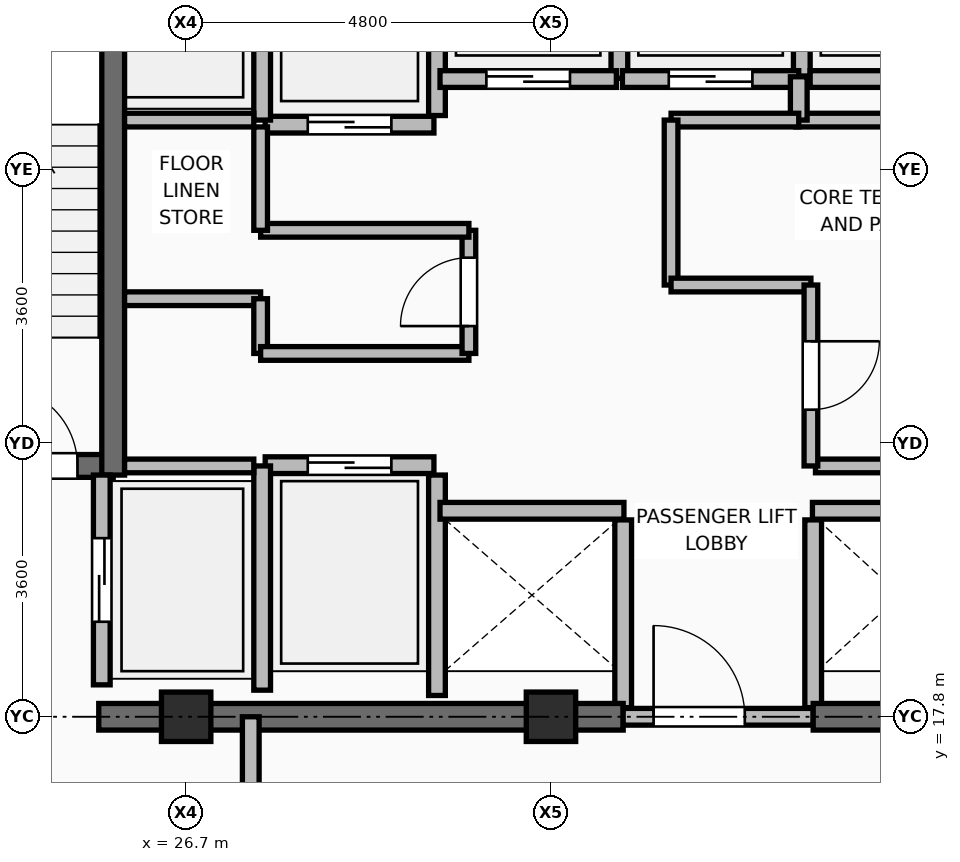
"""IFC4 building model, lengths in metres.
Left out: names, types, materials, properties, quantities, classifications, styles, units other than length and angle.
Written with IfcOpenShell. Run it as: python <this file> out.ifc"""

import sys

from ifc_helpers import new_model, si_unit, direction, frame, frame_2d, origin, origin_2d, place, context, subcontext, project, spatial, rectangle, extrude, element, fill, save


model = new_model("IFC4")
c1 = context("Model", 3, precision=1e-05, world=origin(), true_north=direction((0.0, 1.0)))
c2 = subcontext(c1, "Body", "Model", "MODEL_VIEW")
j1 = project(units=[si_unit("LENGTHUNIT", "METRE"), si_unit("PLANEANGLEUNIT", "RADIAN")], contexts=[c1])
p1 = place(None, origin())
s1 = spatial("IfcSite", under=j1, at=p1, CompositionType="ELEMENT")
p2 = place(p1, origin())
s2 = spatial("IfcBuilding", under=s1, at=p2, CompositionType="ELEMENT")
p3 = place(p2, frame((0.0, 0.0, 278.85)))
s3 = spatial("IfcBuildingStorey", under=s2, at=p3, CompositionType="ELEMENT", Elevation=278.85)
for number, where, z_axis, x_axis in (
    (1, (26.7, 17.8, 0.0), (0.0, 0.0, 1.0), (1.0, 0.0, 0.0)),
    (2, (31.5, 17.8, 0.0), (0.0, 0.0, 1.0), (1.0, 0.0, 0.0)),
):
    element("IfcColumn", number, at=place(p3, frame(where, z_axis=z_axis, x_axis=x_axis)), inside=s3, PredefinedType="COLUMN", context=c2, shape_type="SweptSolid", body=[
        extrude(rectangle(XDim=0.65, YDim=0.65, at=origin_2d()), origin(), (0.0, 0.0, 1.0), 3.75),
    ])
p4 = place(p3, frame((30.0, 18.08, 0.0), z_axis=(0.0, 0.0, 1.0), x_axis=(0.0, 1.0, 0.0)))
e3 = element("IfcWall", 3, at=p4, inside=s3, PredefinedType="PARTITIONING", context=c2, shape_type="SweptSolid", body=[
    extrude(rectangle(XDim=2.9, YDim=0.22, at=frame_2d((1.45, 0.0))), origin(), (0.0, 0.0, 1.0), 3.545),
])
for number, where, z_axis, x_axis in (
    (4, (32.45, 17.92, 0.0), (0.0, 0.0, 1.0), (0.0, 1.0, 0.0)),
    (5, (34.95, 17.92, 0.0), (0.0, 0.0, 1.0), (0.0, 1.0, 0.0)),
):
    element("IfcWall", number, at=place(p3, frame(where, z_axis=z_axis, x_axis=x_axis)), inside=s3, PredefinedType="PARTITIONING", context=c2, shape_type="SweptSolid", body=[
        extrude(rectangle(XDim=2.47, YDim=0.22, at=frame_2d((1.235, 0.0))), origin(), (0.0, 0.0, 1.0), 3.545),
    ])
p5 = place(p3, frame((30.0, 25.71, 0.0), z_axis=(0.0, 0.0, 1.0), x_axis=(0.0, 1.0, 0.0)))
e6 = element("IfcWall", 6, at=p5, inside=s3, PredefinedType="PARTITIONING", context=c2, shape_type="SweptSolid", body=[
    extrude(rectangle(XDim=2.73, YDim=0.22, at=frame_2d((1.365, 0.0))), origin(), (0.0, 0.0, 1.0), 3.545),
])
p6 = place(p3, frame((32.4, 26.2, 0.0), z_axis=(0.0, 0.0, 1.0), x_axis=(0.0, 1.0, 0.0)))
e7 = element("IfcWall", 7, at=p6, inside=s3, PredefinedType="PARTITIONING", context=c2, shape_type="SweptSolid", body=[
    extrude(rectangle(XDim=2.24, YDim=0.22, at=frame_2d((1.12, 0.0))), origin(), (0.0, 0.0, 1.0), 3.545),
])
p7 = place(p3, frame((34.8, 26.23, 0.0), z_axis=(0.0, 0.0, 1.0), x_axis=(0.0, 1.0, 0.0)))
e8 = element("IfcWall", 8, at=p7, inside=s3, PredefinedType="PARTITIONING", context=c2, shape_type="SweptSolid", body=[
    extrude(rectangle(XDim=2.21, YDim=0.22, at=frame_2d((1.105, 0.0))), origin(), (0.0, 0.0, 1.0), 3.545),
])
p8 = place(p3, frame((34.91, 26.19, 0.0), z_axis=(0.0, 0.0, 1.0), x_axis=(1.0, 0.0, 0.0)))
e9 = element("IfcWall", 9, at=p8, inside=s3, PredefinedType="PARTITIONING", context=c2, shape_type="SweptSolid", body=[
    extrude(rectangle(XDim=2.14, YDim=0.22, at=frame_2d((1.07, 0.0))), origin(), (0.0, 0.0, 1.0), 3.545),
])
p9 = place(p3, frame((25.55, 17.8, 0.0), z_axis=(0.0, 0.0, 1.0), x_axis=(1.0, 0.0, 0.0)))
e10 = element("IfcWall", 10, at=p9, inside=s3, PredefinedType="SHEAR", context=c2, shape_type="SweptSolid", body=[
    extrude(rectangle(XDim=6.9, YDim=0.35, at=frame_2d((3.45, 0.0))), origin(), (0.0, 0.0, 1.0), 3.57),
])
p10 = place(p3, frame((32.45, 17.8, 0.0), z_axis=(0.0, 0.0, 1.0), x_axis=(1.0, 0.0, 0.0)))
e11 = element("IfcWall", 11, at=p10, inside=s3, PredefinedType="PARTITIONING", context=c2, shape_type="SweptSolid", body=[
    extrude(rectangle(XDim=2.5, YDim=0.22, at=frame_2d((1.25, 0.0))), origin(), (0.0, 0.0, 1.0), 3.132),
])
p11 = place(p10, frame((0.4, 0.0, 0.0)))
e12 = element("IfcOpeningElement", 12, at=p11, cuts=e11, PredefinedType="OPENING", context=c2, shape_type="SweptSolid", body=[
    extrude(rectangle(XDim=1.2, YDim=2.1, at=frame_2d((0.6, 1.05))), frame((0.0, 0.12, 0.0), z_axis=(0.0, -1.0, 0.0), x_axis=(1.0, 0.0, 0.0)), (0.0, 0.0, 1.0), 0.24),
])
p12 = place(p3, frame((34.95, 17.8, 0.0), z_axis=(0.0, 0.0, 1.0), x_axis=(1.0, 0.0, 0.0)))
e13 = element("IfcWall", 13, at=p12, inside=s3, PredefinedType="SHEAR", context=c2, shape_type="SweptSolid", body=[
    extrude(rectangle(XDim=6.325, YDim=0.35, at=frame_2d((3.163, 0.0))), origin(), (0.0, 0.0, 1.0), 3.57),
])
p13 = place(p3, frame((22.075, 21.1, 0.0), z_axis=(0.0, 0.0, 1.0), x_axis=(1.0, 0.0, 0.0)))
e14 = element("IfcWall", 14, at=p13, inside=s3, PredefinedType="SHEAR", context=c2, shape_type="SweptSolid", body=[
    extrude(rectangle(XDim=3.665, YDim=0.3, at=frame_2d((1.833, 0.0))), origin(), (0.0, 0.0, 1.0), 3.57),
])
p14 = place(p13, frame((2.145, 0.0, 0.0)))
e15 = element("IfcOpeningElement", 15, at=p14, cuts=e14, PredefinedType="OPENING", context=c2, shape_type="SweptSolid", body=[
    extrude(rectangle(XDim=1.05, YDim=2.1, at=frame_2d((0.525, 1.05))), frame((0.0, 0.16, 0.0), z_axis=(0.0, -1.0, 0.0), x_axis=(1.0, 0.0, 0.0)), (0.0, 0.0, 1.0), 0.32),
])
p15 = place(p3, frame((25.74, 20.98, 0.0), z_axis=(0.0, 0.0, 1.0), x_axis=(0.0, 1.0, 0.0)))
e16 = element("IfcWall", 16, at=p15, inside=s3, PredefinedType="SHEAR", context=c2, shape_type="SweptSolid", body=[
    extrude(rectangle(XDim=7.99, YDim=0.3, at=frame_2d((3.995, 0.0))), origin(), (0.0, 0.0, 1.0), 3.57),
])
p16 = place(p3, frame((25.59, 18.22, 0.0), z_axis=(0.0, 0.0, 1.0), x_axis=(0.0, 1.0, 0.0)))
e17 = element("IfcWall", 17, at=p16, inside=s3, PredefinedType="PARTITIONING", context=c2, shape_type="SweptSolid", body=[
    extrude(rectangle(XDim=2.76, YDim=0.22, at=frame_2d((1.38, 0.0))), origin(), (0.0, 0.0, 1.0), 3.55),
])
p17 = place(p16, frame((0.83, 0.0, 0.0)))
e18 = element("IfcOpeningElement", 18, at=p17, cuts=e17, PredefinedType="OPENING", context=c2, shape_type="SweptSolid", body=[
    extrude(rectangle(XDim=1.1, YDim=2.2, at=frame_2d((0.55, 1.1))), frame((0.0, 0.12, 0.0), z_axis=(0.0, -1.0, 0.0), x_axis=(1.0, 0.0, 0.0)), (0.0, 0.0, 1.0), 0.24),
])
p18 = place(p3, frame((27.74, 21.11, 0.0), z_axis=(0.0, 0.0, 1.0), x_axis=(1.0, 0.0, 0.0)))
e19 = element("IfcWall", 19, at=p18, inside=s3, PredefinedType="PARTITIONING", context=c2, shape_type="SweptSolid", body=[
    extrude(rectangle(XDim=2.22, YDim=0.22, at=frame_2d((1.11, 0.0))), origin(), (0.0, 0.0, 1.0), 3.55),
])
p19 = place(p18, frame((0.56, 0.0, 0.0)))
e20 = element("IfcOpeningElement", 20, at=p19, cuts=e19, PredefinedType="OPENING", context=c2, shape_type="SweptSolid", body=[
    extrude(rectangle(XDim=1.1, YDim=2.2, at=frame_2d((0.55, 1.1))), frame((0.0, 0.12, 0.0), z_axis=(0.0, -1.0, 0.0), x_axis=(1.0, 0.0, 0.0)), (0.0, 0.0, 1.0), 0.24),
])
p20 = place(p3, frame((27.74, 25.59, 0.0), z_axis=(0.0, 0.0, 1.0), x_axis=(1.0, 0.0, 0.0)))
e21 = element("IfcWall", 21, at=p20, inside=s3, PredefinedType="PARTITIONING", context=c2, shape_type="SweptSolid", body=[
    extrude(rectangle(XDim=2.22, YDim=0.22, at=frame_2d((1.11, 0.0))), origin(), (0.0, 0.0, 1.0), 3.55),
])
p21 = place(p20, frame((0.56, 0.0, 0.0)))
e22 = element("IfcOpeningElement", 22, at=p21, cuts=e21, PredefinedType="OPENING", context=c2, shape_type="SweptSolid", body=[
    extrude(rectangle(XDim=1.1, YDim=2.2, at=frame_2d((0.55, 1.1))), frame((0.0, 0.12, 0.0), z_axis=(0.0, -1.0, 0.0), x_axis=(1.0, 0.0, 0.0)), (0.0, 0.0, 1.0), 0.24),
])
p22 = place(p3, frame((30.04, 20.51, 0.0), z_axis=(0.0, 0.0, 1.0), x_axis=(1.0, 0.0, 0.0)))
e23 = element("IfcWall", 23, at=p22, inside=s3, PredefinedType="PARTITIONING", context=c2, shape_type="SweptSolid", body=[
    extrude(rectangle(XDim=2.42, YDim=0.22, at=frame_2d((1.21, 0.0))), origin(), (0.0, 0.0, 1.0), 3.55),
])
p23 = place(p3, frame((34.94, 20.51, 0.0), z_axis=(0.0, 0.0, 1.0), x_axis=(1.0, 0.0, 0.0)))
e24 = element("IfcWall", 24, at=p23, inside=s3, PredefinedType="PARTITIONING", context=c2, shape_type="SweptSolid", body=[
    extrude(rectangle(XDim=2.24, YDim=0.22, at=frame_2d((1.12, 0.0))), origin(), (0.0, 0.0, 1.0), 3.55),
])
p24 = place(p3, frame((30.04, 26.19, 0.0), z_axis=(0.0, 0.0, 1.0), x_axis=(1.0, 0.0, 0.0)))
e25 = element("IfcWall", 25, at=p24, inside=s3, PredefinedType="PARTITIONING", context=c2, shape_type="SweptSolid", body=[
    extrude(rectangle(XDim=2.32, YDim=0.22, at=frame_2d((1.16, 0.0))), origin(), (0.0, 0.0, 1.0), 3.55),
])
p25 = place(p24, frame((0.61, 0.0, 0.0)))
e26 = element("IfcOpeningElement", 26, at=p25, cuts=e25, PredefinedType="OPENING", context=c2, shape_type="SweptSolid", body=[
    extrude(rectangle(XDim=1.1, YDim=2.2, at=frame_2d((0.55, 1.1))), frame((0.0, 0.12, 0.0), z_axis=(0.0, -1.0, 0.0), x_axis=(1.0, 0.0, 0.0)), (0.0, 0.0, 1.0), 0.24),
])
p26 = place(p3, frame((32.44, 26.19, 0.0), z_axis=(0.0, 0.0, 1.0), x_axis=(1.0, 0.0, 0.0)))
e27 = element("IfcWall", 27, at=p26, inside=s3, PredefinedType="PARTITIONING", context=c2, shape_type="SweptSolid", body=[
    extrude(rectangle(XDim=2.32, YDim=0.22, at=frame_2d((1.16, 0.0))), origin(), (0.0, 0.0, 1.0), 3.55),
])
p27 = place(p26, frame((0.61, 0.0, 0.0)))
e28 = element("IfcOpeningElement", 28, at=p27, cuts=e27, PredefinedType="OPENING", context=c2, shape_type="SweptSolid", body=[
    extrude(rectangle(XDim=1.1, YDim=2.2, at=frame_2d((0.55, 1.1))), frame((0.0, 0.12, 0.0), z_axis=(0.0, -1.0, 0.0), x_axis=(1.0, 0.0, 0.0)), (0.0, 0.0, 1.0), 0.24),
])
p28 = place(p3, frame((27.7, 18.15, 0.0), z_axis=(0.0, 0.0, 1.0), x_axis=(0.0, 1.0, 0.0)))
e29 = element("IfcWall", 29, at=p28, inside=s3, PredefinedType="PARTITIONING", context=c2, shape_type="SweptSolid", body=[
    extrude(rectangle(XDim=2.95, YDim=0.22, at=frame_2d((1.475, 0.0))), origin(), (0.0, 0.0, 1.0), 3.55),
])
p29 = place(p3, frame((27.7, 25.65, 0.0), z_axis=(0.0, 0.0, 1.0), x_axis=(0.0, 1.0, 0.0)))
e30 = element("IfcWall", 30, at=p29, inside=s3, PredefinedType="PARTITIONING", context=c2, shape_type="SweptSolid", body=[
    extrude(rectangle(XDim=3.0, YDim=0.22, at=frame_2d((1.5, 0.0))), origin(), (0.0, 0.0, 1.0), 3.55),
])
for number, where, z_axis, x_axis in (
    (31, (25.89, 21.1, 0.0), (0.0, 0.0, 1.0), (1.0, 0.0, 0.0)),
    (32, (25.89, 25.65, 0.0), (0.0, 0.0, 1.0), (1.0, 0.0, 0.0)),
):
    element("IfcWall", number, at=place(p3, frame(where, z_axis=z_axis, x_axis=x_axis)), inside=s3, PredefinedType="PARTITIONING", context=c2, shape_type="SweptSolid", body=[
        extrude(rectangle(XDim=1.7, YDim=0.18, at=frame_2d((0.85, 0.0))), origin(), (0.0, 0.0, 1.0), 3.55),
    ])
p30 = place(p3, frame((25.89, 23.3, 0.0), z_axis=(0.0, 0.0, 1.0), x_axis=(1.0, 0.0, 0.0)))
e33 = element("IfcWall", 33, at=p30, inside=s3, PredefinedType="PARTITIONING", context=c2, shape_type="SweptSolid", body=[
    extrude(rectangle(XDim=1.79, YDim=0.18, at=frame_2d((0.895, 0.0))), origin(), (0.0, 0.0, 1.0), 3.55),
])
p31 = place(p3, frame((27.68, 22.58, 0.0), z_axis=(0.0, 0.0, 1.0), x_axis=(0.0, 1.0, 0.0)))
e34 = element("IfcWall", 34, at=p31, inside=s3, PredefinedType="PARTITIONING", context=c2, shape_type="SweptSolid", body=[
    extrude(rectangle(XDim=0.72, YDim=0.18, at=frame_2d((0.36, 0.0))), origin(), (0.0, 0.0, 1.0), 3.55),
])
p32 = place(p3, frame((27.68, 22.58, 0.0), z_axis=(0.0, 0.0, 1.0), x_axis=(1.0, 0.0, 0.0)))
e35 = element("IfcWall", 35, at=p32, inside=s3, PredefinedType="PARTITIONING", context=c2, shape_type="SweptSolid", body=[
    extrude(rectangle(XDim=2.74, YDim=0.18, at=frame_2d((1.37, 0.0))), origin(), (0.0, 0.0, 1.0), 3.55),
])
p33 = place(p3, frame((30.42, 22.58, 0.0), z_axis=(0.0, 0.0, 1.0), x_axis=(0.0, 1.0, 0.0)))
e36 = element("IfcWall", 36, at=p33, inside=s3, PredefinedType="PARTITIONING", context=c2, shape_type="SweptSolid", body=[
    extrude(rectangle(XDim=1.62, YDim=0.18, at=frame_2d((0.81, 0.0))), origin(), (0.0, 0.0, 1.0), 3.55),
])
p34 = place(p33, frame((0.36, 0.0, 0.0)))
e37 = element("IfcOpeningElement", 37, at=p34, cuts=e36, PredefinedType="OPENING", context=c2, shape_type="SweptSolid", body=[
    extrude(rectangle(XDim=0.9, YDim=2.1, at=frame_2d((0.45, 1.05))), frame((0.0, 0.1, 0.0), z_axis=(0.0, -1.0, 0.0), x_axis=(1.0, 0.0, 0.0)), (0.0, 0.0, 1.0), 0.2),
])
p35 = place(p3, frame((27.68, 24.2, 0.0), z_axis=(0.0, 0.0, 1.0), x_axis=(1.0, 0.0, 0.0)))
e38 = element("IfcWall", 38, at=p35, inside=s3, PredefinedType="PARTITIONING", context=c2, shape_type="SweptSolid", body=[
    extrude(rectangle(XDim=2.74, YDim=0.18, at=frame_2d((1.37, 0.0))), origin(), (0.0, 0.0, 1.0), 3.55),
])
p36 = place(p3, frame((27.68, 24.2, 0.0), z_axis=(0.0, 0.0, 1.0), x_axis=(0.0, 1.0, 0.0)))
e39 = element("IfcWall", 39, at=p36, inside=s3, PredefinedType="PARTITIONING", context=c2, shape_type="SweptSolid", body=[
    extrude(rectangle(XDim=1.36, YDim=0.18, at=frame_2d((0.68, 0.0))), origin(), (0.0, 0.0, 1.0), 3.55),
])
p37 = place(p3, frame((34.98, 21.1, 0.0), z_axis=(0.0, 0.0, 1.0), x_axis=(1.0, 0.0, 0.0)))
e40 = element("IfcWall", 40, at=p37, inside=s3, PredefinedType="PARTITIONING", context=c2, shape_type="SweptSolid", body=[
    extrude(rectangle(XDim=2.08, YDim=0.18, at=frame_2d((1.04, 0.0))), origin(), (0.0, 0.0, 1.0), 3.55),
])
p38 = place(p3, frame((34.72, 25.65, 0.0), z_axis=(0.0, 0.0, 1.0), x_axis=(1.0, 0.0, 0.0)))
e41 = element("IfcWall", 41, at=p38, inside=s3, PredefinedType="PARTITIONING", context=c2, shape_type="SweptSolid", body=[
    extrude(rectangle(XDim=2.34, YDim=0.18, at=frame_2d((1.17, 0.0))), origin(), (0.0, 0.0, 1.0), 3.55),
])
p39 = place(p3, frame((34.76, 25.65, 0.0), z_axis=(0.0, 0.0, 1.0), x_axis=(0.0, 1.0, 0.0)))
e42 = element("IfcWall", 42, at=p39, inside=s3, PredefinedType="PARTITIONING", context=c2, shape_type="SweptSolid", body=[
    extrude(rectangle(XDim=0.57, YDim=0.22, at=frame_2d((0.285, 0.0))), origin(), (0.0, 0.0, 1.0), 3.55),
])
p40 = place(p3, frame((33.08, 25.65, 0.0), z_axis=(0.0, 0.0, 1.0), x_axis=(1.0, 0.0, 0.0)))
e43 = element("IfcWall", 43, at=p40, inside=s3, PredefinedType="PARTITIONING", context=c2, shape_type="SweptSolid", body=[
    extrude(rectangle(XDim=1.68, YDim=0.18, at=frame_2d((0.84, 0.0))), origin(), (0.0, 0.0, 1.0), 3.55),
])
p41 = place(p3, frame((33.08, 23.48, 0.0), z_axis=(0.0, 0.0, 1.0), x_axis=(0.0, 1.0, 0.0)))
e44 = element("IfcWall", 44, at=p41, inside=s3, PredefinedType="PARTITIONING", context=c2, shape_type="SweptSolid", body=[
    extrude(rectangle(XDim=2.17, YDim=0.18, at=frame_2d((1.085, 0.0))), origin(), (0.0, 0.0, 1.0), 3.55),
])
p42 = place(p3, frame((33.08, 23.48, 0.0), z_axis=(0.0, 0.0, 1.0), x_axis=(1.0, 0.0, 0.0)))
e45 = element("IfcWall", 45, at=p42, inside=s3, PredefinedType="PARTITIONING", context=c2, shape_type="SweptSolid", body=[
    extrude(rectangle(XDim=1.84, YDim=0.18, at=frame_2d((0.92, 0.0))), origin(), (0.0, 0.0, 1.0), 3.55),
])
p43 = place(p3, frame((34.92, 21.1, 0.0), z_axis=(0.0, 0.0, 1.0), x_axis=(0.0, 1.0, 0.0)))
e46 = element("IfcWall", 46, at=p43, inside=s3, PredefinedType="PARTITIONING", context=c2, shape_type="SweptSolid", body=[
    extrude(rectangle(XDim=2.38, YDim=0.18, at=frame_2d((1.19, 0.0))), origin(), (0.0, 0.0, 1.0), 3.55),
])
p44 = place(p43, frame((0.74, 0.0, 0.0)))
e47 = element("IfcOpeningElement", 47, at=p44, cuts=e46, PredefinedType="OPENING", context=c2, shape_type="SweptSolid", body=[
    extrude(rectangle(XDim=0.9, YDim=2.1, at=frame_2d((0.45, 1.05))), frame((0.0, 0.1, 0.0), z_axis=(0.0, -1.0, 0.0), x_axis=(1.0, 0.0, 0.0)), (0.0, 0.0, 1.0), 0.2),
])
p45 = place(p3, frame((27.55, 14.35, 0.0), z_axis=(0.0, 0.0, 1.0), x_axis=(0.0, 1.0, 0.0)))
e48 = element("IfcWall", 48, at=p45, inside=s3, PredefinedType="PARTITIONING", context=c2, shape_type="SweptSolid", body=[
    extrude(rectangle(XDim=3.45, YDim=0.22, at=frame_2d((1.725, 0.0))), origin(), (0.0, 0.0, 1.0), 3.132),
])
p46 = place(p45, frame((1.175, 0.0, 0.0)))
e49 = element("IfcOpeningElement", 49, at=p46, cuts=e48, PredefinedType="OPENING", context=c2, shape_type="SweptSolid", body=[
    extrude(rectangle(XDim=1.1, YDim=2.1, at=frame_2d((0.55, 1.05))), frame((0.0, 0.12, 0.0), z_axis=(0.0, -1.0, 0.0), x_axis=(1.0, 0.0, 0.0)), (0.0, 0.0, 1.0), 0.24),
])
p47 = place(p11, origin())
e50 = element("IfcDoor", 50, at=p47, inside=s3, OperationType="SINGLE_SWING_LEFT", PredefinedType="DOOR", context=c2, shape_type="SweptSolid", body=[
    extrude(rectangle(XDim=1.2, YDim=2.1, at=frame_2d((0.6, 1.05))), frame((0.0, 0.025, 0.0), z_axis=(0.0, -1.0, 0.0), x_axis=(1.0, 0.0, 0.0)), (0.0, 0.0, 1.0), 0.05),
])
fill(e12, e50)
p48 = place(p14, origin())
e51 = element("IfcDoor", 51, at=p48, inside=s3, OperationType="SINGLE_SWING_LEFT", PredefinedType="DOOR", context=c2, shape_type="SweptSolid", body=[
    extrude(rectangle(XDim=1.05, YDim=2.1, at=frame_2d((0.525, 1.05))), frame((0.0, 0.025, 0.0), z_axis=(0.0, -1.0, 0.0), x_axis=(1.0, 0.0, 0.0)), (0.0, 0.0, 1.0), 0.05),
])
fill(e15, e51)
p49 = place(p17, origin())
e52 = element("IfcDoor", 52, at=p49, inside=s3, OperationType="DOUBLE_DOOR_SLIDING", PredefinedType="DOOR", context=c2, shape_type="SweptSolid", body=[
    extrude(rectangle(XDim=1.1, YDim=2.2, at=frame_2d((0.55, 1.1))), frame((0.0, 0.025, 0.0), z_axis=(0.0, -1.0, 0.0), x_axis=(1.0, 0.0, 0.0)), (0.0, 0.0, 1.0), 0.05),
])
fill(e18, e52)
p50 = place(p19, origin())
e53 = element("IfcDoor", 53, at=p50, inside=s3, OperationType="DOUBLE_DOOR_SLIDING", PredefinedType="DOOR", context=c2, shape_type="SweptSolid", body=[
    extrude(rectangle(XDim=1.1, YDim=2.2, at=frame_2d((0.55, 1.1))), frame((0.0, 0.025, 0.0), z_axis=(0.0, -1.0, 0.0), x_axis=(1.0, 0.0, 0.0)), (0.0, 0.0, 1.0), 0.05),
])
fill(e20, e53)
p51 = place(p21, frame((1.1, 0.0, 0.0), z_axis=(0.0, 0.0, 1.0), x_axis=(-1.0, 0.0, 0.0)))
e54 = element("IfcDoor", 54, at=p51, inside=s3, OperationType="DOUBLE_DOOR_SLIDING", PredefinedType="DOOR", context=c2, shape_type="SweptSolid", body=[
    extrude(rectangle(XDim=1.1, YDim=2.2, at=frame_2d((0.55, 1.1))), frame((0.0, 0.025, 0.0), z_axis=(0.0, -1.0, 0.0), x_axis=(1.0, 0.0, 0.0)), (0.0, 0.0, 1.0), 0.05),
])
fill(e22, e54)
p52 = place(p25, frame((1.1, 0.0, 0.0), z_axis=(0.0, 0.0, 1.0), x_axis=(-1.0, 0.0, 0.0)))
e55 = element("IfcDoor", 55, at=p52, inside=s3, OperationType="DOUBLE_DOOR_SLIDING", PredefinedType="DOOR", context=c2, shape_type="SweptSolid", body=[
    extrude(rectangle(XDim=1.1, YDim=2.2, at=frame_2d((0.55, 1.1))), frame((0.0, 0.025, 0.0), z_axis=(0.0, -1.0, 0.0), x_axis=(1.0, 0.0, 0.0)), (0.0, 0.0, 1.0), 0.05),
])
fill(e26, e55)
p53 = place(p27, frame((1.1, 0.0, 0.0), z_axis=(0.0, 0.0, 1.0), x_axis=(-1.0, 0.0, 0.0)))
e56 = element("IfcDoor", 56, at=p53, inside=s3, OperationType="DOUBLE_DOOR_SLIDING", PredefinedType="DOOR", context=c2, shape_type="SweptSolid", body=[
    extrude(rectangle(XDim=1.1, YDim=2.2, at=frame_2d((0.55, 1.1))), frame((0.0, 0.025, 0.0), z_axis=(0.0, -1.0, 0.0), x_axis=(1.0, 0.0, 0.0)), (0.0, 0.0, 1.0), 0.05),
])
fill(e28, e56)
p54 = place(p34, origin())
e57 = element("IfcDoor", 57, at=p54, inside=s3, OperationType="SINGLE_SWING_LEFT", PredefinedType="DOOR", context=c2, shape_type="SweptSolid", body=[
    extrude(rectangle(XDim=0.9, YDim=2.1, at=frame_2d((0.45, 1.05))), frame((0.0, 0.025, 0.0), z_axis=(0.0, -1.0, 0.0), x_axis=(1.0, 0.0, 0.0)), (0.0, 0.0, 1.0), 0.05),
])
fill(e37, e57)
p55 = place(p44, frame((0.9, 0.0, 0.0), z_axis=(0.0, 0.0, 1.0), x_axis=(-1.0, 0.0, 0.0)))
e58 = element("IfcDoor", 58, at=p55, inside=s3, OperationType="SINGLE_SWING_LEFT", PredefinedType="DOOR", context=c2, shape_type="SweptSolid", body=[
    extrude(rectangle(XDim=0.9, YDim=2.1, at=frame_2d((0.45, 1.05))), frame((0.0, 0.025, 0.0), z_axis=(0.0, -1.0, 0.0), x_axis=(1.0, 0.0, 0.0)), (0.0, 0.0, 1.0), 0.05),
])
fill(e47, e58)
save(model, sys.argv[1])
